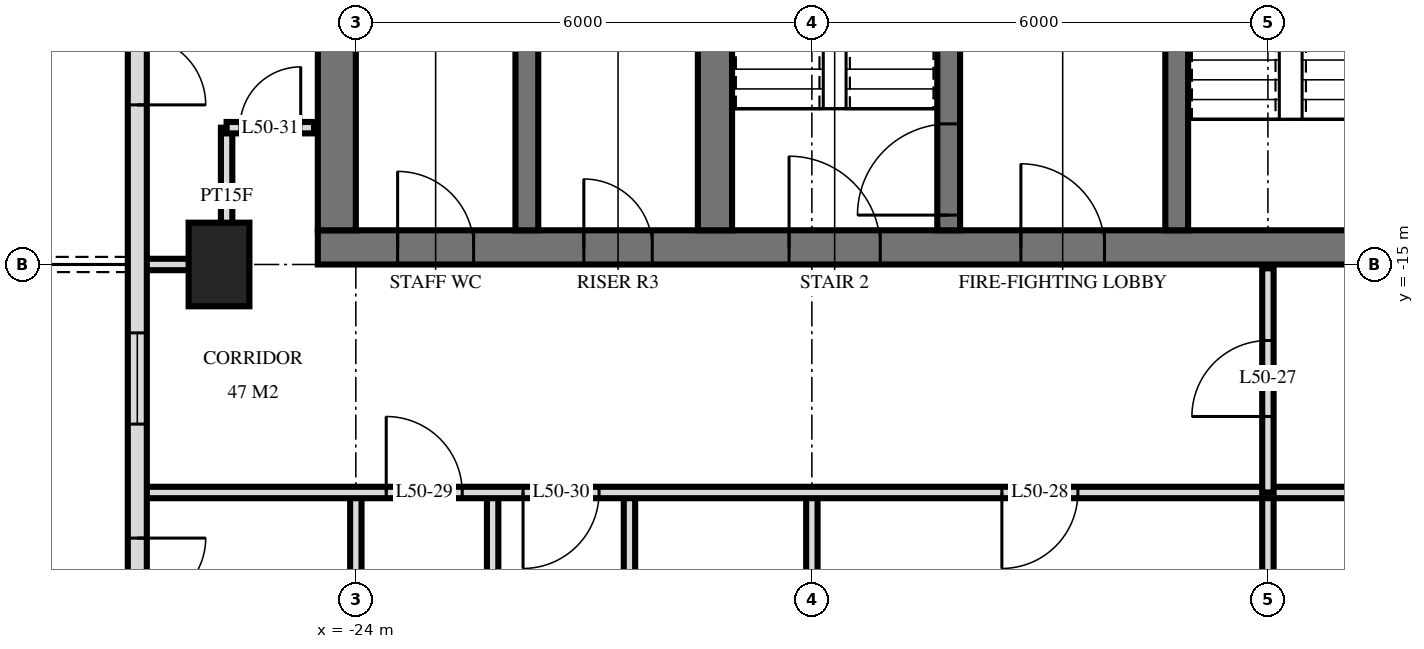
"""IFC4 building model, lengths in metres.
Left out: names, types, materials, properties, quantities, classifications, styles, units other than length and angle.
Written with IfcOpenShell. Run it as: python <this file> out.ifc"""

import sys

from ifc_helpers import new_model, si_unit, direction, frame, frame_2d, origin, origin_2d, place, context, subcontext, project, spatial, rectangle, extrude, element, fill, save


model = new_model("IFC4")
c1 = context("Model", 3, precision=1e-05, world=origin(), true_north=direction((0.0, 1.0)))
c2 = subcontext(c1, "Body", "Model", "MODEL_VIEW")
j1 = project(units=[si_unit("LENGTHUNIT", "METRE"), si_unit("PLANEANGLEUNIT", "RADIAN")], contexts=[c1])
p1 = place(None, origin())
s1 = spatial("IfcSite", under=j1, at=p1, CompositionType="ELEMENT")
p2 = place(p1, origin())
s2 = spatial("IfcBuilding", under=s1, at=p2, CompositionType="ELEMENT")
p3 = place(p2, frame((0.0, 0.0, 194.1)))
s3 = spatial("IfcBuildingStorey", under=s2, at=p3, CompositionType="ELEMENT", Elevation=194.1)
p4 = place(p3, frame((-25.8, -15.0, 0.0), z_axis=(0.0, 0.0, 1.0), x_axis=(0.0, 1.0, 0.0)))
e1 = element("IfcColumn", 1, at=p4, inside=s3, PredefinedType="COLUMN", context=c2, shape_type="SweptSolid", body=[
    extrude(rectangle(XDim=1.1, YDim=0.8, at=origin_2d()), origin(), (0.0, 0.0, 1.0), 3.5),
])
p5 = place(p3, frame((-24.5, -14.775, 0.0), z_axis=(0.0, 0.0, 1.0), x_axis=(1.0, 0.0, 0.0)))
e2 = element("IfcWall", 2, at=p5, inside=s3, PredefinedType="SHEAR", context=c2, shape_type="SweptSolid", body=[
    extrude(rectangle(XDim=14.5, YDim=0.45, at=frame_2d((7.25, 0.0))), origin(), (0.0, 0.0, 1.0), 3.5),
])
p6 = place(p5, frame((6.2, 0.0, 0.0)))
e3 = element("IfcOpeningElement", 3, at=p6, cuts=e2, PredefinedType="OPENING", context=c2, shape_type="SweptSolid", body=[
    extrude(rectangle(XDim=1.2, YDim=2.1, at=frame_2d((0.6, 1.05))), frame((0.0, 0.235, 0.0), z_axis=(0.0, -1.0, 0.0), x_axis=(1.0, 0.0, 0.0)), (0.0, 0.0, 1.0), 0.47),
])
p7 = place(p5, frame((9.25, 0.0, 0.0)))
e4 = element("IfcOpeningElement", 4, at=p7, cuts=e2, PredefinedType="OPENING", context=c2, shape_type="SweptSolid", body=[
    extrude(rectangle(XDim=1.1, YDim=2.1, at=frame_2d((0.55, 1.05))), frame((0.0, 0.235, 0.0), z_axis=(0.0, -1.0, 0.0), x_axis=(1.0, 0.0, 0.0)), (0.0, 0.0, 1.0), 0.47),
])
p8 = place(p5, frame((3.5, 0.0, 0.0)))
e5 = element("IfcOpeningElement", 5, at=p8, cuts=e2, PredefinedType="OPENING", context=c2, shape_type="SweptSolid", body=[
    extrude(rectangle(XDim=0.9, YDim=2.1, at=frame_2d((0.45, 1.05))), frame((0.0, 0.235, 0.0), z_axis=(0.0, -1.0, 0.0), x_axis=(1.0, 0.0, 0.0)), (0.0, 0.0, 1.0), 0.47),
])
p9 = place(p5, frame((1.05, 0.0, 0.0)))
e6 = element("IfcOpeningElement", 6, at=p9, cuts=e2, PredefinedType="OPENING", context=c2, shape_type="SweptSolid", body=[
    extrude(rectangle(XDim=1.0, YDim=2.1, at=frame_2d((0.5, 1.05))), frame((0.0, 0.235, 0.0), z_axis=(0.0, -1.0, 0.0), x_axis=(1.0, 0.0, 0.0)), (0.0, 0.0, 1.0), 0.47),
])
p10 = place(p3, frame((-24.25, -14.55, 0.0), z_axis=(0.0, 0.0, 1.0), x_axis=(0.0, 1.0, 0.0)))
e7 = element("IfcWall", 7, at=p10, inside=s3, PredefinedType="SHEAR", context=c2, shape_type="SweptSolid", body=[
    extrude(rectangle(XDim=14.1, YDim=0.5, at=frame_2d((7.05, 0.0))), origin(), (0.0, 0.0, 1.0), 3.5),
])
p11 = place(p3, frame((-13.2, -14.55, 0.0), z_axis=(0.0, 0.0, 1.0), x_axis=(0.0, 1.0, 0.0)))
e8 = element("IfcWall", 8, at=p11, inside=s3, PredefinedType="SHEAR", context=c2, shape_type="SweptSolid", body=[
    extrude(rectangle(XDim=5.4, YDim=0.3, at=frame_2d((2.7, 0.0))), origin(), (0.0, 0.0, 1.0), 3.5),
])
p12 = place(p11, frame((4.0, 0.0, 0.0)))
e9 = element("IfcOpeningElement", 9, at=p12, cuts=e8, PredefinedType="OPENING", context=c2, shape_type="SweptSolid", body=[
    extrude(rectangle(XDim=1.2, YDim=2.1, at=frame_2d((0.6, 1.05))), frame((0.0, 0.16, 0.0), z_axis=(0.0, -1.0, 0.0), x_axis=(1.0, 0.0, 0.0)), (0.0, 0.0, 1.0), 0.32),
])
p13 = place(p3, frame((-16.2, -14.55, 0.0), z_axis=(0.0, 0.0, 1.0), x_axis=(0.0, 1.0, 0.0)))
e10 = element("IfcWall", 10, at=p13, inside=s3, PredefinedType="SHEAR", context=c2, shape_type="SweptSolid", body=[
    extrude(rectangle(XDim=5.4, YDim=0.3, at=frame_2d((2.7, 0.0))), origin(), (0.0, 0.0, 1.0), 3.5),
])
p14 = place(p13, frame((0.2, 0.0, 0.0)))
e11 = element("IfcOpeningElement", 11, at=p14, cuts=e10, PredefinedType="OPENING", context=c2, shape_type="SweptSolid", body=[
    extrude(rectangle(XDim=1.2, YDim=2.1, at=frame_2d((0.6, 1.05))), frame((0.0, 0.16, 0.0), z_axis=(0.0, -1.0, 0.0), x_axis=(1.0, 0.0, 0.0)), (0.0, 0.0, 1.0), 0.32),
])
p15 = place(p3, frame((-19.275, -14.55, 0.0), z_axis=(0.0, 0.0, 1.0), x_axis=(0.0, 1.0, 0.0)))
e12 = element("IfcWall", 12, at=p15, inside=s3, PredefinedType="SHEAR", context=c2, shape_type="SweptSolid", body=[
    extrude(rectangle(XDim=5.4, YDim=0.45, at=frame_2d((2.7, 0.0))), origin(), (0.0, 0.0, 1.0), 3.5),
])
p16 = place(p3, frame((-21.75, -14.55, 0.0), z_axis=(0.0, 0.0, 1.0), x_axis=(0.0, 1.0, 0.0)))
e13 = element("IfcWall", 13, at=p16, inside=s3, PredefinedType="SHEAR", context=c2, shape_type="SweptSolid", body=[
    extrude(rectangle(XDim=5.4, YDim=0.3, at=frame_2d((2.7, 0.0))), origin(), (0.0, 0.0, 1.0), 3.5),
])
p17 = place(p3, frame((-26.875, -3.325, 0.0), z_axis=(0.0, 0.0, 1.0), x_axis=(0.0, -1.0, 0.0)))
e14 = element("IfcWall", 14, at=p17, inside=s3, PredefinedType="SOLIDWALL", context=c2, shape_type="SweptSolid", body=[
    extrude(rectangle(XDim=21.551, YDim=0.25, at=frame_2d((10.775, 0.0))), origin(), (0.0, 0.0, 1.0), 3.22),
])
p18 = place(p17, frame((7.775, 0.0, 0.0)))
e15 = element("IfcOpeningElement", 15, at=p18, cuts=e14, PredefinedType="OPENING", context=c2, shape_type="SweptSolid", body=[
    extrude(rectangle(XDim=1.8, YDim=2.4, at=frame_2d((0.9, 1.2))), frame((0.0, 0.135, 0.0), z_axis=(0.0, -1.0, 0.0), x_axis=(1.0, 0.0, 0.0)), (0.0, 0.0, 1.0), 0.27),
])
p19 = place(p17, frame((12.575, 0.0, 0.9)))
e16 = element("IfcOpeningElement", 16, at=p19, cuts=e14, PredefinedType="OPENING", context=c2, shape_type="SweptSolid", body=[
    extrude(rectangle(XDim=1.2, YDim=1.5, at=frame_2d((0.6, 0.75))), frame((0.0, 0.135, 0.0), z_axis=(0.0, -1.0, 0.0), x_axis=(1.0, 0.0, 0.0)), (0.0, 0.0, 1.0), 0.27),
])
p20 = place(p17, frame((15.275, 0.0, 0.0)))
e17 = element("IfcOpeningElement", 17, at=p20, cuts=e14, PredefinedType="OPENING", context=c2, shape_type="SweptSolid", body=[
    extrude(rectangle(XDim=1.8, YDim=2.4, at=frame_2d((0.9, 1.2))), frame((0.0, 0.135, 0.0), z_axis=(0.0, -1.0, 0.0), x_axis=(1.0, 0.0, 0.0)), (0.0, 0.0, 1.0), 0.27),
])
p21 = place(p17, frame((19.325, 0.0, 0.0)))
e18 = element("IfcOpeningElement", 18, at=p21, cuts=e14, PredefinedType="OPENING", context=c2, shape_type="SweptSolid", body=[
    extrude(rectangle(XDim=1.8, YDim=2.4, at=frame_2d((0.9, 1.2))), frame((0.0, 0.135, 0.0), z_axis=(0.0, -1.0, 0.0), x_axis=(1.0, 0.0, 0.0)), (0.0, 0.0, 1.0), 0.27),
])
p22 = place(p3, frame((-12.0, -18.0, 0.0), z_axis=(0.0, 0.0, 1.0), x_axis=(0.0, 1.0, 0.0)))
e19 = element("IfcWall", 19, at=p22, inside=s3, PredefinedType="PARTITIONING", context=c2, shape_type="SweptSolid", body=[
    extrude(rectangle(XDim=2.95, YDim=0.15, at=frame_2d((1.475, 0.0))), origin(), (0.0, 0.0, 1.0), 3.22),
])
p23 = place(p22, frame((1.0, 0.0, 0.0)))
e20 = element("IfcOpeningElement", 20, at=p23, cuts=e19, PredefinedType="OPENING", context=c2, shape_type="SweptSolid", body=[
    extrude(rectangle(XDim=1.0, YDim=2.1, at=frame_2d((0.5, 1.05))), frame((0.0, 0.085, 0.0), z_axis=(0.0, -1.0, 0.0), x_axis=(1.0, 0.0, 0.0)), (0.0, 0.0, 1.0), 0.17),
])
for number, where, z_axis, x_axis in (
    (21, (-12.0, -29.22, 0.0), (0.0, 0.0, 1.0), (0.0, 1.0, 0.0)),
    (22, (-18.0, -29.22, 0.0), (0.0, 0.0, 1.0), (0.0, 1.0, 0.0)),
):
    element("IfcWall", number, at=place(p3, frame(where, z_axis=z_axis, x_axis=x_axis)), inside=s3, PredefinedType="PARTITIONING", context=c2, shape_type="SweptSolid", body=[
        extrude(rectangle(XDim=11.22, YDim=0.15, at=frame_2d((5.61, 0.0))), origin(), (0.0, 0.0, 1.0), 3.22),
    ])
for number, where, z_axis, x_axis in (
    (23, (-20.4, -22.2, 0.0), (0.0, 0.0, 1.0), (0.0, 1.0, 0.0)),
    (24, (-22.2, -22.2, 0.0), (0.0, 0.0, 1.0), (0.0, 1.0, 0.0)),
):
    element("IfcWall", number, at=place(p3, frame(where, z_axis=z_axis, x_axis=x_axis)), inside=s3, PredefinedType="PARTITIONING", context=c2, shape_type="SweptSolid", body=[
        extrude(rectangle(XDim=4.2, YDim=0.15, at=frame_2d((2.1, 0.0))), origin(), (0.0, 0.0, 1.0), 3.22),
    ])
p24 = place(p3, frame((-24.0, -22.2, 0.0), z_axis=(0.0, 0.0, 1.0), x_axis=(0.0, 1.0, 0.0)))
e25 = element("IfcWall", 25, at=p24, inside=s3, PredefinedType="PARTITIONING", context=c2, shape_type="SweptSolid", body=[
    extrude(rectangle(XDim=4.2, YDim=0.15, at=frame_2d((2.1, 0.0))), origin(), (0.0, 0.0, 1.0), 3.22),
])
p25 = place(p24, frame((1.58, 0.0, 0.0)))
e26 = element("IfcOpeningElement", 26, at=p25, cuts=e25, PredefinedType="OPENING", context=c2, shape_type="SweptSolid", body=[
    extrude(rectangle(XDim=1.0, YDim=2.1, at=frame_2d((0.5, 1.05))), frame((0.0, 0.085, 0.0), z_axis=(0.0, -1.0, 0.0), x_axis=(1.0, 0.0, 0.0)), (0.0, 0.0, 1.0), 0.17),
])
p26 = place(p3, frame((-25.7, -15.0, 0.0), z_axis=(0.0, 0.0, 1.0), x_axis=(0.0, 1.0, 0.0)))
e27 = element("IfcWall", 27, at=p26, inside=s3, PredefinedType="PARTITIONING", context=c2, shape_type="SweptSolid", body=[
    extrude(rectangle(XDim=1.8, YDim=0.15, at=frame_2d((0.9, 0.0))), origin(), (0.0, 0.0, 1.0), 3.22),
])
p27 = place(p3, frame((-26.82, -18.0, 0.0), z_axis=(0.0, 0.0, 1.0), x_axis=(1.0, 0.0, 0.0)))
e28 = element("IfcWall", 28, at=p27, inside=s3, PredefinedType="PARTITIONING", context=c2, shape_type="SweptSolid", body=[
    extrude(rectangle(XDim=53.64, YDim=0.15, at=frame_2d((26.82, 0.0))), origin(), (0.0, 0.0, 1.0), 3.22),
])
p28 = place(p27, frame((11.32, 0.0, 0.0)))
e29 = element("IfcOpeningElement", 29, at=p28, cuts=e28, PredefinedType="OPENING", context=c2, shape_type="SweptSolid", body=[
    extrude(rectangle(XDim=1.0, YDim=2.1, at=frame_2d((0.5, 1.05))), frame((0.0, 0.085, 0.0), z_axis=(0.0, -1.0, 0.0), x_axis=(1.0, 0.0, 0.0)), (0.0, 0.0, 1.0), 0.17),
])
p29 = place(p27, frame((3.22, 0.0, 0.0)))
e30 = element("IfcOpeningElement", 30, at=p29, cuts=e28, PredefinedType="OPENING", context=c2, shape_type="SweptSolid", body=[
    extrude(rectangle(XDim=1.0, YDim=2.1, at=frame_2d((0.5, 1.05))), frame((0.0, 0.085, 0.0), z_axis=(0.0, -1.0, 0.0), x_axis=(1.0, 0.0, 0.0)), (0.0, 0.0, 1.0), 0.17),
])
p30 = place(p27, frame((5.02, 0.0, 0.0)))
e31 = element("IfcOpeningElement", 31, at=p30, cuts=e28, PredefinedType="OPENING", context=c2, shape_type="SweptSolid", body=[
    extrude(rectangle(XDim=1.0, YDim=2.1, at=frame_2d((0.5, 1.05))), frame((0.0, 0.085, 0.0), z_axis=(0.0, -1.0, 0.0), x_axis=(1.0, 0.0, 0.0)), (0.0, 0.0, 1.0), 0.17),
])
p31 = place(p27, frame((38.97, 0.0, 0.0)))
e32 = element("IfcOpeningElement", 32, at=p31, cuts=e28, PredefinedType="OPENING", context=c2, shape_type="SweptSolid", body=[
    extrude(rectangle(XDim=1.0, YDim=2.1, at=frame_2d((0.5, 1.05))), frame((0.0, 0.085, 0.0), z_axis=(0.0, -1.0, 0.0), x_axis=(1.0, 0.0, 0.0)), (0.0, 0.0, 1.0), 0.17),
])
p32 = place(p27, frame((48.72, 0.0, 0.0)))
e33 = element("IfcOpeningElement", 33, at=p32, cuts=e28, PredefinedType="OPENING", context=c2, shape_type="SweptSolid", body=[
    extrude(rectangle(XDim=1.0, YDim=2.1, at=frame_2d((0.5, 1.05))), frame((0.0, 0.085, 0.0), z_axis=(0.0, -1.0, 0.0), x_axis=(1.0, 0.0, 0.0)), (0.0, 0.0, 1.0), 0.17),
])
p33 = place(p27, frame((46.92, 0.0, 0.0)))
e34 = element("IfcOpeningElement", 34, at=p33, cuts=e28, PredefinedType="OPENING", context=c2, shape_type="SweptSolid", body=[
    extrude(rectangle(XDim=1.0, YDim=2.1, at=frame_2d((0.5, 1.05))), frame((0.0, 0.085, 0.0), z_axis=(0.0, -1.0, 0.0), x_axis=(1.0, 0.0, 0.0)), (0.0, 0.0, 1.0), 0.17),
])
p34 = place(p27, frame((17.32, 0.0, 0.0)))
e35 = element("IfcOpeningElement", 35, at=p34, cuts=e28, PredefinedType="OPENING", context=c2, shape_type="SweptSolid", body=[
    extrude(rectangle(XDim=1.0, YDim=2.1, at=frame_2d((0.5, 1.05))), frame((0.0, 0.085, 0.0), z_axis=(0.0, -1.0, 0.0), x_axis=(1.0, 0.0, 0.0)), (0.0, 0.0, 1.0), 0.17),
])
p35 = place(p27, frame((23.32, 0.0, 0.0)))
e36 = element("IfcOpeningElement", 36, at=p35, cuts=e28, PredefinedType="OPENING", context=c2, shape_type="SweptSolid", body=[
    extrude(rectangle(XDim=1.0, YDim=2.1, at=frame_2d((0.5, 1.05))), frame((0.0, 0.085, 0.0), z_axis=(0.0, -1.0, 0.0), x_axis=(1.0, 0.0, 0.0)), (0.0, 0.0, 1.0), 0.17),
])
p36 = place(p27, frame((29.32, 0.0, 0.0)))
e37 = element("IfcOpeningElement", 37, at=p36, cuts=e28, PredefinedType="OPENING", context=c2, shape_type="SweptSolid", body=[
    extrude(rectangle(XDim=1.0, YDim=2.1, at=frame_2d((0.5, 1.05))), frame((0.0, 0.085, 0.0), z_axis=(0.0, -1.0, 0.0), x_axis=(1.0, 0.0, 0.0)), (0.0, 0.0, 1.0), 0.17),
])
p37 = place(p27, frame((35.32, 0.0, 0.0)))
e38 = element("IfcOpeningElement", 38, at=p37, cuts=e28, PredefinedType="OPENING", context=c2, shape_type="SweptSolid", body=[
    extrude(rectangle(XDim=1.0, YDim=2.1, at=frame_2d((0.5, 1.05))), frame((0.0, 0.085, 0.0), z_axis=(0.0, -1.0, 0.0), x_axis=(1.0, 0.0, 0.0)), (0.0, 0.0, 1.0), 0.17),
])
p38 = place(p3, frame((-26.82, -15.0, 0.0), z_axis=(0.0, 0.0, 1.0), x_axis=(1.0, 0.0, 0.0)))
e39 = element("IfcWall", 39, at=p38, inside=s3, PredefinedType="PARTITIONING", context=c2, shape_type="SweptSolid", body=[
    extrude(rectangle(XDim=1.12, YDim=0.15, at=frame_2d((0.56, 0.0))), origin(), (0.0, 0.0, 1.0), 3.22),
])
p39 = place(p3, frame((-25.7, -13.2, 0.0), z_axis=(0.0, 0.0, 1.0), x_axis=(1.0, 0.0, 0.0)))
e40 = element("IfcWall", 40, at=p39, inside=s3, PredefinedType="PARTITIONING", context=c2, shape_type="SweptSolid", body=[
    extrude(rectangle(XDim=1.15, YDim=0.15, at=frame_2d((0.575, 0.0))), origin(), (0.0, 0.0, 1.0), 3.22),
])
p40 = place(p39, frame((0.175, 0.0, 0.0)))
e41 = element("IfcOpeningElement", 41, at=p40, cuts=e40, PredefinedType="OPENING", context=c2, shape_type="SweptSolid", body=[
    extrude(rectangle(XDim=0.8, YDim=2.1, at=frame_2d((0.4, 1.05))), frame((0.0, 0.085, 0.0), z_axis=(0.0, -1.0, 0.0), x_axis=(1.0, 0.0, 0.0)), (0.0, 0.0, 1.0), 0.17),
])
p41 = place(p18, origin())
e42 = element("IfcDoor", 42, at=p41, inside=s3, OperationType="DOUBLE_DOOR_SINGLE_SWING", PredefinedType="DOOR", context=c2, shape_type="SweptSolid", body=[
    extrude(rectangle(XDim=1.8, YDim=2.4, at=frame_2d((0.9, 1.2))), frame((0.0, 0.025, 0.0), z_axis=(0.0, -1.0, 0.0), x_axis=(1.0, 0.0, 0.0)), (0.0, 0.0, 1.0), 0.05),
])
fill(e15, e42)
p42 = place(p19, origin())
e43 = element("IfcWindow", 43, at=p42, inside=s3, PartitioningType="SINGLE_PANEL", PredefinedType="WINDOW", context=c2, shape_type="SweptSolid", body=[
    extrude(rectangle(XDim=1.2, YDim=1.5, at=frame_2d((0.6, 0.75))), frame((0.0, 0.03, 0.0), z_axis=(0.0, -1.0, 0.0), x_axis=(1.0, 0.0, 0.0)), (0.0, 0.0, 1.0), 0.06),
])
fill(e16, e43)
p43 = place(p20, origin())
e44 = element("IfcDoor", 44, at=p43, inside=s3, OperationType="DOUBLE_DOOR_SINGLE_SWING", PredefinedType="DOOR", context=c2, shape_type="SweptSolid", body=[
    extrude(rectangle(XDim=1.8, YDim=2.4, at=frame_2d((0.9, 1.2))), frame((0.0, 0.025, 0.0), z_axis=(0.0, -1.0, 0.0), x_axis=(1.0, 0.0, 0.0)), (0.0, 0.0, 1.0), 0.05),
])
fill(e17, e44)
p44 = place(p6, origin())
e45 = element("IfcDoor", 45, at=p44, inside=s3, OperationType="SINGLE_SWING_RIGHT", PredefinedType="DOOR", context=c2, shape_type="SweptSolid", body=[
    extrude(rectangle(XDim=1.2, YDim=2.1, at=frame_2d((0.6, 1.05))), frame((0.0, 0.025, 0.0), z_axis=(0.0, -1.0, 0.0), x_axis=(1.0, 0.0, 0.0)), (0.0, 0.0, 1.0), 0.05),
])
fill(e3, e45)
p45 = place(p7, origin())
e46 = element("IfcDoor", 46, at=p45, inside=s3, OperationType="SINGLE_SWING_RIGHT", PredefinedType="DOOR", context=c2, shape_type="SweptSolid", body=[
    extrude(rectangle(XDim=1.1, YDim=2.1, at=frame_2d((0.55, 1.05))), frame((0.0, 0.025, 0.0), z_axis=(0.0, -1.0, 0.0), x_axis=(1.0, 0.0, 0.0)), (0.0, 0.0, 1.0), 0.05),
])
fill(e4, e46)
p46 = place(p8, origin())
e47 = element("IfcDoor", 47, at=p46, inside=s3, OperationType="SINGLE_SWING_RIGHT", PredefinedType="DOOR", context=c2, shape_type="SweptSolid", body=[
    extrude(rectangle(XDim=0.9, YDim=2.1, at=frame_2d((0.45, 1.05))), frame((0.0, 0.025, 0.0), z_axis=(0.0, -1.0, 0.0), x_axis=(1.0, 0.0, 0.0)), (0.0, 0.0, 1.0), 0.05),
])
fill(e5, e47)
p47 = place(p9, origin())
e48 = element("IfcDoor", 48, at=p47, inside=s3, OperationType="SINGLE_SWING_RIGHT", PredefinedType="DOOR", context=c2, shape_type="SweptSolid", body=[
    extrude(rectangle(XDim=1.0, YDim=2.1, at=frame_2d((0.5, 1.05))), frame((0.0, 0.025, 0.0), z_axis=(0.0, -1.0, 0.0), x_axis=(1.0, 0.0, 0.0)), (0.0, 0.0, 1.0), 0.05),
])
fill(e6, e48)
p48 = place(p14, origin())
e49 = element("IfcDoor", 49, at=p48, inside=s3, OperationType="SINGLE_SWING_RIGHT", PredefinedType="DOOR", context=c2, shape_type="SweptSolid", body=[
    extrude(rectangle(XDim=1.2, YDim=2.1, at=frame_2d((0.6, 1.05))), frame((0.0, 0.025, 0.0), z_axis=(0.0, -1.0, 0.0), x_axis=(1.0, 0.0, 0.0)), (0.0, 0.0, 1.0), 0.05),
])
fill(e11, e49)
p49 = place(p23, origin())
e50 = element("IfcDoor", 50, at=p49, inside=s3, OperationType="SINGLE_SWING_RIGHT", PredefinedType="DOOR", context=c2, shape_type="SweptSolid", body=[
    extrude(rectangle(XDim=1.0, YDim=2.1, at=frame_2d((0.5, 1.05))), frame((0.0, 0.025, 0.0), z_axis=(0.0, -1.0, 0.0), x_axis=(1.0, 0.0, 0.0)), (0.0, 0.0, 1.0), 0.05),
])
fill(e20, e50)
p50 = place(p28, frame((0.5, 0.0, 0.0), z_axis=(0.0, 0.0, 1.0), x_axis=(-1.0, 0.0, 0.0)))
e51 = element("IfcDoor", 51, at=p50, inside=s3, OperationType="SINGLE_SWING_LEFT", PredefinedType="DOOR", context=c2, shape_type="SweptSolid", body=[
    extrude(rectangle(XDim=1.0, YDim=2.1, at=frame_2d((0.0, 1.05))), frame((0.0, -0.025, 0.0), z_axis=(0.0, 1.0, 0.0), x_axis=(-1.0, 0.0, 0.0)), (0.0, 0.0, 1.0), 0.05),
])
fill(e29, e51)
p51 = place(p29, origin())
e52 = element("IfcDoor", 52, at=p51, inside=s3, OperationType="SINGLE_SWING_RIGHT", PredefinedType="DOOR", context=c2, shape_type="SweptSolid", body=[
    extrude(rectangle(XDim=1.0, YDim=2.1, at=frame_2d((0.5, 1.05))), frame((0.0, 0.025, 0.0), z_axis=(0.0, -1.0, 0.0), x_axis=(1.0, 0.0, 0.0)), (0.0, 0.0, 1.0), 0.05),
])
fill(e30, e52)
p52 = place(p30, frame((0.5, 0.0, 0.0), z_axis=(0.0, 0.0, 1.0), x_axis=(-1.0, 0.0, 0.0)))
e53 = element("IfcDoor", 53, at=p52, inside=s3, OperationType="SINGLE_SWING_LEFT", PredefinedType="DOOR", context=c2, shape_type="SweptSolid", body=[
    extrude(rectangle(XDim=1.0, YDim=2.1, at=frame_2d((0.0, 1.05))), frame((0.0, -0.025, 0.0), z_axis=(0.0, 1.0, 0.0), x_axis=(-1.0, 0.0, 0.0)), (0.0, 0.0, 1.0), 0.05),
])
fill(e31, e53)
p53 = place(p40, origin())
e54 = element("IfcDoor", 54, at=p53, inside=s3, OperationType="SINGLE_SWING_LEFT", PredefinedType="DOOR", context=c2, shape_type="SweptSolid", body=[
    extrude(rectangle(XDim=0.8, YDim=2.1, at=frame_2d((0.4, 1.05))), frame((0.0, 0.025, 0.0), z_axis=(0.0, -1.0, 0.0), x_axis=(1.0, 0.0, 0.0)), (0.0, 0.0, 1.0), 0.05),
])
fill(e41, e54)
save(model, sys.argv[1])
